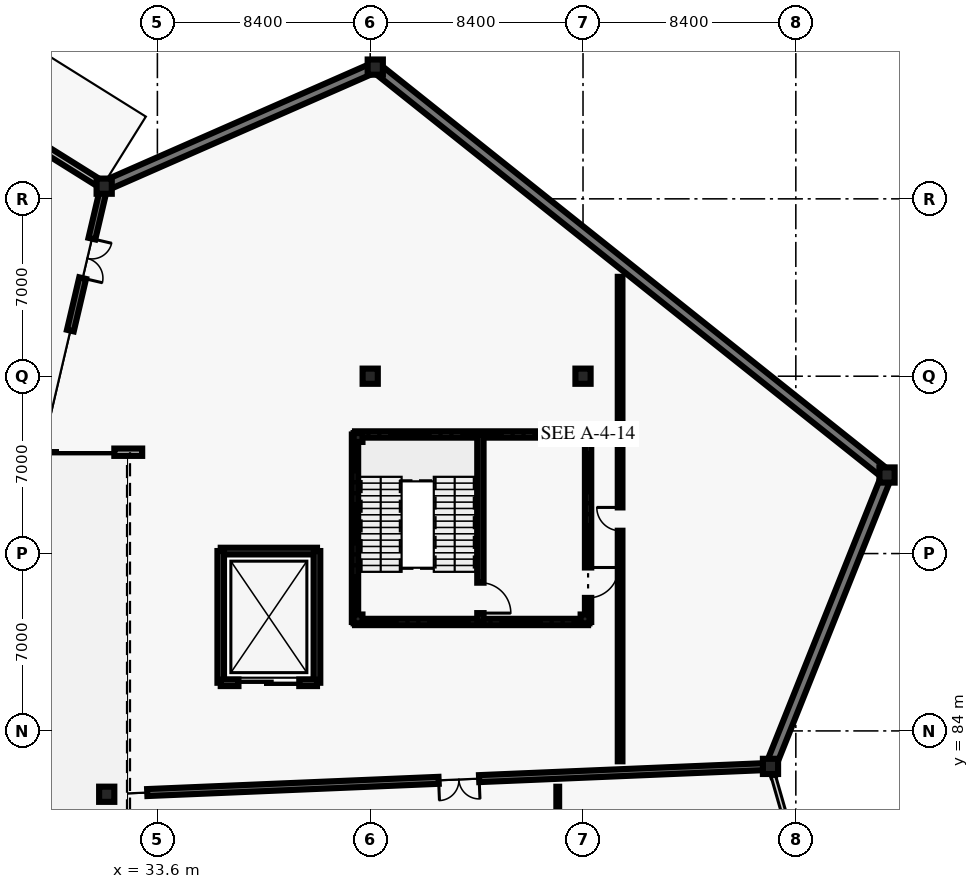
"""IFC4 building model, lengths in metres.
Left out: names, types, materials, properties, quantities, classifications, styles, units other than length and angle.
Written with IfcOpenShell. Run it as: python <this file> out.ifc"""

import sys

from ifc_helpers import new_model, si_unit, direction, frame, frame_2d, origin, origin_2d, place, context, subcontext, project, spatial, rectangle, i_section, extrude, element, fill, save


model = new_model("IFC4")
c1 = context("Model", 3, precision=1e-05, world=origin(), true_north=direction((0.0, 1.0)))
c2 = subcontext(c1, "Body", "Model", "MODEL_VIEW")
j1 = project(units=[si_unit("LENGTHUNIT", "METRE"), si_unit("PLANEANGLEUNIT", "RADIAN")], contexts=[c1])
p1 = place(None, origin())
s1 = spatial("IfcSite", under=j1, at=p1, CompositionType="ELEMENT")
p2 = place(p1, origin())
s2 = spatial("IfcBuilding", under=s1, at=p2, CompositionType="ELEMENT")
p3 = place(p2, origin())
s3 = spatial("IfcBuildingStorey", under=s2, at=p3, CompositionType="ELEMENT", Elevation=0.0)
for number, where, z_axis, x_axis in (
    (1, (31.5, 105.5, 0.0), (0.0, 0.0, 1.0), (1.0, 0.0, 0.0)),
    (2, (31.6, 81.5, 0.0), (0.0, 0.0, 1.0), (1.0, 0.0, 0.0)),
    (3, (42.2, 110.2, 0.0), (0.0, 0.0, 1.0), (1.0, 0.0, 0.0)),
    (4, (57.8, 82.6, 0.0), (0.0, 0.0, 1.0), (1.0, 0.0, 0.0)),
    (5, (62.4, 94.1, 0.0), (0.0, 0.0, 1.0), (1.0, 0.0, 0.0)),
    (6, (42.0, 98.0, 0.0), (0.0, 0.0, 1.0), (1.0, 0.0, 0.0)),
    (7, (50.4, 98.0, 0.0), (0.0, 0.0, 1.0), (1.0, 0.0, 0.0)),
):
    element("IfcColumn", number, at=place(p3, frame(where, z_axis=z_axis, x_axis=x_axis)), inside=s3, PredefinedType="COLUMN", context=c2, shape_type="SweptSolid", body=[
        extrude(rectangle(XDim=0.6, YDim=0.6, at=origin_2d()), origin(), (0.0, 0.0, 1.0), 5.4),
    ])
for number, where, z_axis, x_axis in (
    (8, (41.52, 88.42, 0.0), (0.0, 0.0, 1.0), (1.0, 0.0, 0.0)),
    (9, (50.48, 88.42, 0.0), (0.0, 0.0, 1.0), (1.0, 0.0, 0.0)),
    (10, (50.48, 95.58, 0.0), (0.0, 0.0, 1.0), (1.0, 0.0, 0.0)),
    (11, (41.52, 95.58, 0.0), (0.0, 0.0, 1.0), (1.0, 0.0, 0.0)),
):
    element("IfcColumn", number, at=place(p3, frame(where, z_axis=z_axis, x_axis=x_axis)), inside=s3, PredefinedType="COLUMN", context=c2, shape_type="SweptSolid", body=[
        extrude(i_section(OverallWidth=0.35, OverallDepth=0.35, WebThickness=0.02, FlangeThickness=0.028, at=origin_2d()), origin(), (0.0, 0.0, 1.0), 5.4),
    ])
p4 = place(p3, frame((57.829, 82.502, 0.0), z_axis=(0.0, 0.0, 1.0), x_axis=(0.275977786159, -0.961164013864, 0.0)))
e12 = element("IfcWall", 12, at=p4, inside=s3, PredefinedType="SOLIDWALL", context=c2, shape_type="SweptSolid", body=[
    extrude(rectangle(XDim=0.308, YDim=0.095, at=frame_2d((0.154, 0.0))), origin(), (0.0, 0.0, 1.0), 4.22),
])
p5 = place(p3, frame((62.4, 94.1, 0.0), z_axis=(0.0, 0.0, 1.0), x_axis=(-0.371407751599, -0.928469860605, 0.0)))
e13 = element("IfcWall", 13, at=p5, inside=s3, PredefinedType="SOLIDWALL", context=c2, shape_type="SweptSolid", body=[
    extrude(rectangle(XDim=12.326, YDim=0.4, at=frame_2d((6.163, 0.0))), origin(), (0.0, 0.0, 1.0), 4.22),
])
p6 = place(p3, frame((42.2, 110.2, 0.0), z_axis=(0.0, 0.0, 1.0), x_axis=(0.78200261515, -0.623275147827, 0.0)))
e14 = element("IfcWall", 14, at=p6, inside=s3, PredefinedType="SOLIDWALL", context=c2, shape_type="SweptSolid", body=[
    extrude(rectangle(XDim=25.831, YDim=0.4, at=frame_2d((12.916, 0.0))), origin(), (0.0, 0.0, 1.0), 4.22),
])
p7 = place(p3, frame((31.555, 105.524, 0.0), z_axis=(0.0, 0.0, 1.0), x_axis=(0.915561631163, 0.402177696474, 0.0)))
e15 = element("IfcWall", 15, at=p7, inside=s3, PredefinedType="SOLIDWALL", context=c2, shape_type="SweptSolid", body=[
    extrude(rectangle(XDim=11.627, YDim=0.4, at=frame_2d((5.813, 0.0))), origin(), (0.0, 0.0, 1.0), 4.22),
])
p8 = place(p3, frame((21.1, 112.0, 0.0), z_axis=(0.0, 0.0, 1.0), x_axis=(0.84799942789, -0.529997141784, 0.0)))
e16 = element("IfcWall", 16, at=p8, inside=s3, PredefinedType="SOLIDWALL", context=c2, shape_type="SweptSolid", body=[
    extrude(rectangle(XDim=12.204, YDim=0.29, at=frame_2d((6.102, 0.0))), origin(), (0.0, 0.0, 1.0), 4.22),
])
p9 = place(p8, frame((4.002, 0.0, 0.0)))
e17 = element("IfcOpeningElement", 17, at=p9, cuts=e16, PredefinedType="OPENING", context=c2, shape_type="SweptSolid", body=[
    extrude(rectangle(XDim=4.2, YDim=3.92, at=frame_2d((2.1, 1.96))), frame((0.0, 0.155, 0.0), z_axis=(0.0, -1.0, 0.0), x_axis=(1.0, 0.0, 0.0)), (0.0, 0.0, 1.0), 0.31),
])
p10 = place(p3, frame((33.0, 95.0, 0.0), z_axis=(0.0, 0.0, 1.0), x_axis=(-1.0, 0.0, 0.0)))
e18 = element("IfcWall", 18, at=p10, inside=s3, PredefinedType="SOLIDWALL", context=c2, shape_type="SweptSolid", body=[
    extrude(rectangle(XDim=7.6, YDim=0.29, at=frame_2d((3.8, 0.0))), origin(), (0.0, 0.0, 1.0), 3.8),
])
p11 = place(p10, frame((1.1, 0.0, 0.0)))
e19 = element("IfcOpeningElement", 19, at=p11, cuts=e18, PredefinedType="OPENING", context=c2, shape_type="SweptSolid", body=[
    extrude(rectangle(XDim=5.2, YDim=2.8, at=frame_2d((2.6, 1.4))), frame((0.0, 0.155, 0.0), z_axis=(0.0, -1.0, 0.0), x_axis=(1.0, 0.0, 0.0)), (0.0, 0.0, 1.0), 0.31),
])
p12 = place(p3, frame((57.8, 82.6, 0.0), z_axis=(0.0, 0.0, 1.0), x_axis=(-0.999119166836, -0.041962965345, 0.0)))
e20 = element("IfcWall", 20, at=p12, inside=s3, PredefinedType="SOLIDWALL", context=c2, shape_type="SweptSolid", body=[
    extrude(rectangle(XDim=24.622, YDim=0.275, at=frame_2d((12.311, 0.0))), origin(), (0.0, 0.0, 1.0), 4.62),
])
p13 = place(p12, frame((11.511, 0.0, 0.0)))
e21 = element("IfcOpeningElement", 21, at=p13, cuts=e20, PredefinedType="OPENING", context=c2, shape_type="SweptSolid", body=[
    extrude(rectangle(XDim=1.6, YDim=2.45, at=frame_2d((0.8, 1.225))), frame((0.0, 0.147, 0.0), z_axis=(0.0, -1.0, 0.0), x_axis=(1.0, 0.0, 0.0)), (0.0, 0.0, 1.0), 0.295),
])
p14 = place(p3, frame((31.5, 105.5, 0.0), z_axis=(0.0, 0.0, 1.0), x_axis=(-0.228035044918, -0.973652924963, 0.0)))
e22 = element("IfcWall", 22, at=p14, inside=s3, PredefinedType="SOLIDWALL", context=c2, shape_type="SweptSolid", body=[
    extrude(rectangle(XDim=5.854, YDim=0.275, at=frame_2d((2.927, 0.0))), origin(), (0.0, 0.0, 1.0), 4.62),
])
p15 = place(p14, frame((2.127, 0.0, 0.0)))
e23 = element("IfcOpeningElement", 23, at=p15, cuts=e22, PredefinedType="OPENING", context=c2, shape_type="SweptSolid", body=[
    extrude(rectangle(XDim=1.6, YDim=2.45, at=frame_2d((0.8, 1.225))), frame((0.0, 0.147, 0.0), z_axis=(0.0, -1.0, 0.0), x_axis=(1.0, 0.0, 0.0)), (0.0, 0.0, 1.0), 0.295),
])
p16 = place(p3, frame((49.403, 57.267, 0.0), z_axis=(0.0, 0.0, 1.0), x_axis=(0.0, 1.0, 0.0)))
e24 = element("IfcWall", 24, at=p16, inside=s3, PredefinedType="PARTITIONING", context=c2, shape_type="SweptSolid", body=[
    extrude(rectangle(XDim=24.53, YDim=0.11, at=frame_2d((12.265, 0.0))), origin(), (0.0, 0.0, 1.0), 3.92),
])
p17 = place(p16, frame((11.79, 0.0, 0.0)))
e25 = element("IfcOpeningElement", 25, at=p17, cuts=e24, PredefinedType="OPENING", context=c2, shape_type="SweptSolid", body=[
    extrude(rectangle(XDim=0.95, YDim=2.15, at=frame_2d((0.475, 1.075))), frame((0.0, 0.065, 0.0), z_axis=(0.0, -1.0, 0.0), x_axis=(1.0, 0.0, 0.0)), (0.0, 0.0, 1.0), 0.13),
])
p18 = place(p3, frame((51.864, 82.801, 0.0), z_axis=(0.0, 0.0, 1.0), x_axis=(0.0, 1.0, 0.0)))
e26 = element("IfcWall", 26, at=p18, inside=s3, PredefinedType="PARTITIONING", context=c2, shape_type="SweptSolid", body=[
    extrude(rectangle(XDim=19.121, YDim=0.185, at=frame_2d((9.561, 0.0))), origin(), (0.0, 0.0, 1.0), 3.92),
])
p19 = place(p18, frame((9.1, 0.0, 0.0)))
e27 = element("IfcOpeningElement", 27, at=p19, cuts=e26, PredefinedType="OPENING", context=c2, shape_type="SweptSolid", body=[
    extrude(rectangle(XDim=0.92, YDim=2.1, at=frame_2d((0.46, 1.05))), frame((0.0, 0.103, 0.0), z_axis=(0.0, -1.0, 0.0), x_axis=(1.0, 0.0, 0.0)), (0.0, 0.0, 1.0), 0.205),
])
p20 = place(p3, frame((41.4, 88.3, 0.0), z_axis=(0.0, 0.0, 1.0), x_axis=(0.0, 1.0, 0.0)))
e28 = element("IfcWall", 28, at=p20, inside=s3, PredefinedType="SHEAR", context=c2, shape_type="SweptSolid", body=[
    extrude(rectangle(XDim=7.4, YDim=0.25, at=frame_2d((3.7, 0.0))), origin(), (0.0, 0.0, 1.0), 5.16),
])
for number, where, z_axis, x_axis in (
    (29, (41.4, 95.7, 0.0), (0.0, 0.0, 1.0), (1.0, 0.0, 0.0)),
    (30, (50.6, 88.3, 0.0), (0.0, 0.0, 1.0), (-1.0, 0.0, 0.0)),
):
    element("IfcWall", number, at=place(p3, frame(where, z_axis=z_axis, x_axis=x_axis)), inside=s3, PredefinedType="SHEAR", context=c2, shape_type="SweptSolid", body=[
        extrude(rectangle(XDim=9.2, YDim=0.25, at=frame_2d((4.6, 0.0))), origin(), (0.0, 0.0, 1.0), 5.16),
    ])
p21 = place(p3, frame((50.6, 95.7, 0.0), z_axis=(0.0, 0.0, 1.0), x_axis=(0.0, -1.0, 0.0)))
e31 = element("IfcWall", 31, at=p21, inside=s3, PredefinedType="SHEAR", context=c2, shape_type="SweptSolid", body=[
    extrude(rectangle(XDim=7.4, YDim=0.25, at=frame_2d((3.7, 0.0))), origin(), (0.0, 0.0, 1.0), 5.16),
])
p22 = place(p21, frame((5.25, 0.0, 0.0)))
e32 = element("IfcOpeningElement", 32, at=p22, cuts=e31, PredefinedType="OPENING", context=c2, shape_type="SweptSolid", body=[
    extrude(rectangle(XDim=1.2, YDim=2.2, at=frame_2d((0.6, 1.1))), frame((0.0, 0.135, 0.0), z_axis=(0.0, -1.0, 0.0), x_axis=(1.0, 0.0, 0.0)), (0.0, 0.0, 1.0), 0.27),
])
p23 = place(p3, frame((46.35, 95.7, 0.0), z_axis=(0.0, 0.0, 1.0), x_axis=(0.0, -1.0, 0.0)))
e33 = element("IfcWall", 33, at=p23, inside=s3, PredefinedType="SHEAR", context=c2, shape_type="SweptSolid", body=[
    extrude(rectangle(XDim=7.4, YDim=0.25, at=frame_2d((3.7, 0.0))), origin(), (0.0, 0.0, 1.0), 5.16),
])
p24 = place(p23, frame((5.85, 0.0, 0.0)))
e34 = element("IfcOpeningElement", 34, at=p24, cuts=e33, PredefinedType="OPENING", context=c2, shape_type="SweptSolid", body=[
    extrude(rectangle(XDim=1.2, YDim=2.2, at=frame_2d((0.6, 1.1))), frame((0.0, 0.135, 0.0), z_axis=(0.0, -1.0, 0.0), x_axis=(1.0, 0.0, 0.0)), (0.0, 0.0, 1.0), 0.27),
])
p25 = place(p3, frame((36.1, 91.1, 0.0), z_axis=(0.0, 0.0, 1.0), x_axis=(1.0, 0.0, 0.0)))
e35 = element("IfcWall", 35, at=p25, inside=s3, PredefinedType="SHEAR", context=c2, shape_type="SweptSolid", body=[
    extrude(rectangle(XDim=3.8, YDim=0.26, at=frame_2d((1.9, 0.0))), origin(), (0.0, 0.0, 1.0), 5.16),
])
for number, where, z_axis, x_axis in (
    (36, (39.9, 91.1, 0.0), (0.0, 0.0, 1.0), (0.0, -1.0, 0.0)),
    (37, (36.1, 85.9, 0.0), (0.0, 0.0, 1.0), (0.0, 1.0, 0.0)),
):
    element("IfcWall", number, at=place(p3, frame(where, z_axis=z_axis, x_axis=x_axis)), inside=s3, PredefinedType="SHEAR", context=c2, shape_type="SweptSolid", body=[
        extrude(rectangle(XDim=5.2, YDim=0.26, at=frame_2d((2.6, 0.0))), origin(), (0.0, 0.0, 1.0), 5.16),
    ])
p26 = place(p3, frame((39.9, 85.9, 0.0), z_axis=(0.0, 0.0, 1.0), x_axis=(-1.0, 0.0, 0.0)))
e38 = element("IfcWall", 38, at=p26, inside=s3, PredefinedType="SHEAR", context=c2, shape_type="SweptSolid", body=[
    extrude(rectangle(XDim=3.8, YDim=0.26, at=frame_2d((1.9, 0.0))), origin(), (0.0, 0.0, 1.0), 5.16),
])
p27 = place(p26, frame((0.7, 0.0, 0.0)))
e39 = element("IfcOpeningElement", 39, at=p27, cuts=e38, PredefinedType="OPENING", context=c2, shape_type="SweptSolid", body=[
    extrude(rectangle(XDim=2.4, YDim=2.85, at=frame_2d((1.2, 1.425))), frame((0.0, 0.14, 0.0), z_axis=(0.0, -1.0, 0.0), x_axis=(1.0, 0.0, 0.0)), (0.0, 0.0, 1.0), 0.28),
])
p28 = place(p11, origin())
e40 = element("IfcDoor", 40, at=p28, inside=s3, OperationType="ROLLINGUP", PredefinedType="GATE", context=c2, shape_type="SweptSolid", body=[
    extrude(rectangle(XDim=5.2, YDim=2.8, at=frame_2d((2.6, 1.4))), frame((0.0, 0.025, 0.0), z_axis=(0.0, -1.0, 0.0), x_axis=(1.0, 0.0, 0.0)), (0.0, 0.0, 1.0), 0.05),
])
fill(e19, e40)
p29 = place(p13, origin())
e41 = element("IfcDoor", 41, at=p29, inside=s3, OperationType="DOUBLE_DOOR_SINGLE_SWING", PredefinedType="DOOR", context=c2, shape_type="SweptSolid", body=[
    extrude(rectangle(XDim=1.6, YDim=2.45, at=frame_2d((0.8, 1.225))), frame((0.0, 0.025, 0.0), z_axis=(0.0, -1.0, 0.0), x_axis=(1.0, 0.0, 0.0)), (0.0, 0.0, 1.0), 0.05),
])
fill(e21, e41)
p30 = place(p15, origin())
e42 = element("IfcDoor", 42, at=p30, inside=s3, OperationType="DOUBLE_DOOR_SINGLE_SWING", PredefinedType="DOOR", context=c2, shape_type="SweptSolid", body=[
    extrude(rectangle(XDim=1.6, YDim=2.45, at=frame_2d((0.8, 1.225))), frame((0.0, 0.025, 0.0), z_axis=(0.0, -1.0, 0.0), x_axis=(1.0, 0.0, 0.0)), (0.0, 0.0, 1.0), 0.05),
])
fill(e23, e42)
p31 = place(p19, origin())
e43 = element("IfcDoor", 43, at=p31, inside=s3, OperationType="SINGLE_SWING_RIGHT", PredefinedType="DOOR", context=c2, shape_type="SweptSolid", body=[
    extrude(rectangle(XDim=0.92, YDim=2.1, at=frame_2d((0.46, 1.05))), frame((0.0, 0.025, 0.0), z_axis=(0.0, -1.0, 0.0), x_axis=(1.0, 0.0, 0.0)), (0.0, 0.0, 1.0), 0.05),
])
fill(e27, e43)
p32 = place(p22, origin())
e44 = element("IfcDoor", 44, at=p32, inside=s3, OperationType="SINGLE_SWING_LEFT", PredefinedType="DOOR", context=c2, shape_type="SweptSolid", body=[
    extrude(rectangle(XDim=1.2, YDim=2.2, at=frame_2d((0.6, 1.1))), frame((0.0, 0.025, 0.0), z_axis=(0.0, -1.0, 0.0), x_axis=(1.0, 0.0, 0.0)), (0.0, 0.0, 1.0), 0.05),
])
fill(e32, e44)
p33 = place(p24, origin())
e45 = element("IfcDoor", 45, at=p33, inside=s3, OperationType="SINGLE_SWING_RIGHT", PredefinedType="DOOR", context=c2, shape_type="SweptSolid", body=[
    extrude(rectangle(XDim=1.2, YDim=2.2, at=frame_2d((0.6, 1.1))), frame((0.0, 0.025, 0.0), z_axis=(0.0, -1.0, 0.0), x_axis=(1.0, 0.0, 0.0)), (0.0, 0.0, 1.0), 0.05),
])
fill(e34, e45)
p34 = place(p27, origin())
e46 = element("IfcDoor", 46, at=p34, inside=s3, OperationType="SLIDING_TO_LEFT", PredefinedType="DOOR", context=c2, shape_type="SweptSolid", body=[
    extrude(rectangle(XDim=2.4, YDim=2.85, at=frame_2d((1.2, 1.425))), frame((0.0, 0.025, 0.0), z_axis=(0.0, -1.0, 0.0), x_axis=(1.0, 0.0, 0.0)), (0.0, 0.0, 1.0), 0.05),
])
fill(e39, e46)
save(model, sys.argv[1])
